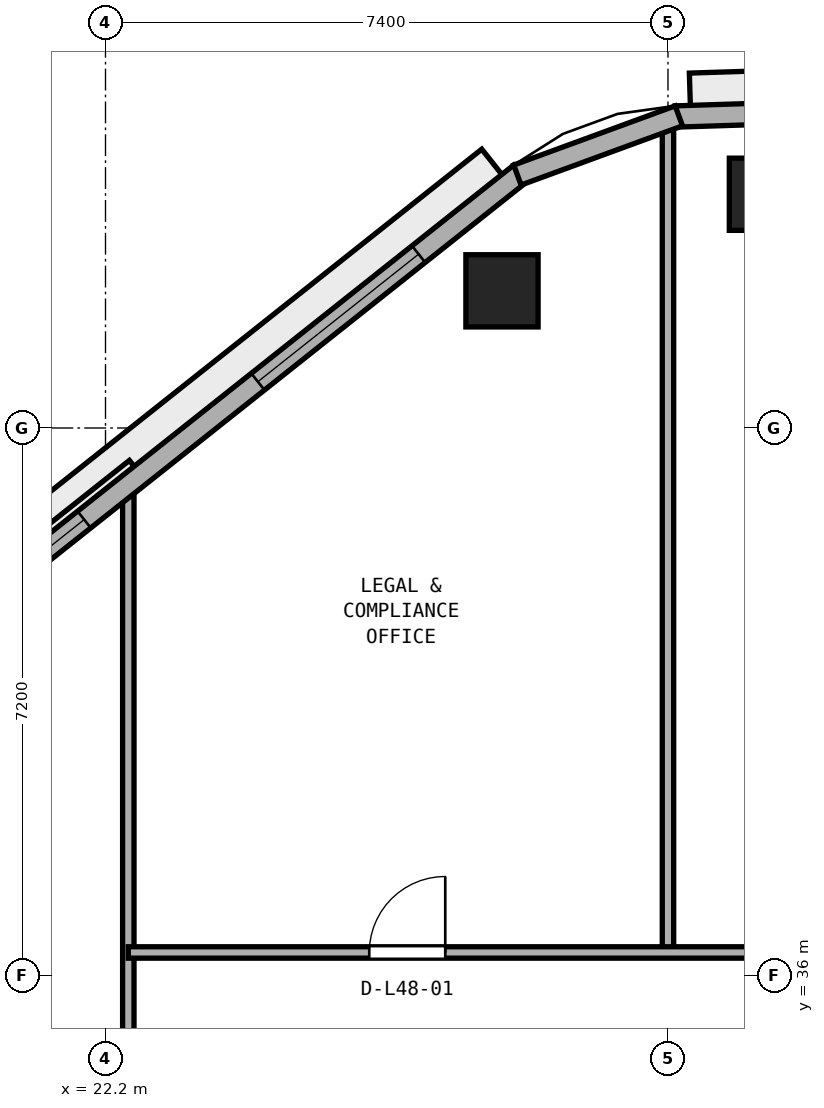
"""IFC4 building model, lengths in metres.
Left out: names, types, materials, properties, quantities, classifications, styles, units other than length and angle.
Written with IfcOpenShell. Run it as: python <this file> out.ifc"""

import sys

from ifc_helpers import new_model, si_unit, direction, frame, frame_2d, origin, origin_2d, place, context, subcontext, project, spatial, rectangle, extrude, element, fill, save


model = new_model("IFC4")
c1 = context("Model", 3, precision=1e-05, world=origin(), true_north=direction((0.0, 1.0)))
c2 = subcontext(c1, "Body", "Model", "MODEL_VIEW")
j1 = project(units=[si_unit("LENGTHUNIT", "METRE"), si_unit("PLANEANGLEUNIT", "RADIAN")], contexts=[c1])
p1 = place(None, origin())
s1 = spatial("IfcSite", under=j1, at=p1, CompositionType="ELEMENT")
p2 = place(p1, origin())
s2 = spatial("IfcBuilding", under=s1, at=p2, CompositionType="ELEMENT")
p3 = place(p2, frame((0.0, 0.0, 189.6)))
s3 = spatial("IfcBuildingStorey", under=s2, at=p3, CompositionType="ELEMENT", Elevation=189.6)
for number, where, z_axis, x_axis in (
    (1, (30.882, 46.275, 0.0), (0.0, 0.0, 1.0), (1.0, 0.0, 0.0)),
    (2, (27.416, 45.004, 0.0), (0.0, 0.0, 1.0), (1.0, 0.0, 0.0)),
):
    element("IfcColumn", number, at=place(p3, frame(where, z_axis=z_axis, x_axis=x_axis)), inside=s3, PredefinedType="COLUMN", context=c2, shape_type="SweptSolid", body=[
        extrude(rectangle(XDim=0.95, YDim=0.95, at=origin_2d()), origin(), (0.0, 0.0, 1.0), 3.8),
    ])
p4 = place(p3, frame((29.6, 36.3, 0.0), z_axis=(0.0, 0.0, 1.0), x_axis=(0.0, 1.0, 0.0)))
e3 = element("IfcWall", 3, at=p4, inside=s3, PredefinedType="PARTITIONING", context=c2, shape_type="SweptSolid", body=[
    extrude(rectangle(XDim=10.919, YDim=0.15, at=frame_2d((5.46, 0.0))), origin(), (0.0, 0.0, 1.0), 3.54),
])
p5 = place(p3, frame((22.5, 26.55, 0.0), z_axis=(0.0, 0.0, 1.0), x_axis=(0.0, 1.0, 0.0)))
e4 = element("IfcWall", 4, at=p5, inside=s3, PredefinedType="PARTITIONING", context=c2, shape_type="SweptSolid", body=[
    extrude(rectangle(XDim=15.945, YDim=0.15, at=frame_2d((7.972, 0.0))), origin(), (0.0, 0.0, 1.0), 3.54),
])
p6 = place(p5, frame((6.35, 0.0, 0.0)))
e5 = element("IfcOpeningElement", 5, at=p6, cuts=e4, PredefinedType="OPENING", context=c2, shape_type="SweptSolid", body=[
    extrude(rectangle(XDim=0.9, YDim=2.1, at=frame_2d((0.45, 1.05))), frame((0.0, 0.085, 0.0), z_axis=(0.0, -1.0, 0.0), x_axis=(1.0, 0.0, 0.0)), (0.0, 0.0, 1.0), 0.17),
])
p7 = place(p3, frame((22.5, 36.3, 0.0), z_axis=(0.0, 0.0, 1.0), x_axis=(1.0, 0.0, 0.0)))
e6 = element("IfcWall", 6, at=p7, inside=s3, PredefinedType="PARTITIONING", context=c2, shape_type="SweptSolid", body=[
    extrude(rectangle(XDim=11.9, YDim=0.15, at=frame_2d((5.95, 0.0))), origin(), (0.0, 0.0, 1.0), 3.54),
])
p8 = place(p7, frame((3.17, 0.0, 0.0)))
e7 = element("IfcOpeningElement", 7, at=p8, cuts=e6, PredefinedType="OPENING", context=c2, shape_type="SweptSolid", body=[
    extrude(rectangle(XDim=1.0, YDim=2.12, at=frame_2d((0.5, 1.06))), frame((0.0, 0.085, 0.0), z_axis=(0.0, -1.0, 0.0), x_axis=(1.0, 0.0, 0.0)), (0.0, 0.0, 1.0), 0.17),
])
p9 = place(p7, frame((8.88, 0.0, 0.0)))
e8 = element("IfcOpeningElement", 8, at=p9, cuts=e6, PredefinedType="OPENING", context=c2, shape_type="SweptSolid", body=[
    extrude(rectangle(XDim=1.0, YDim=2.12, at=frame_2d((0.5, 1.06))), frame((0.0, 0.085, 0.0), z_axis=(0.0, -1.0, 0.0), x_axis=(1.0, 0.0, 0.0)), (0.0, 0.0, 1.0), 0.17),
])
p10 = place(p3, frame((46.143, 47.82, 0.0), z_axis=(0.0, 0.0, 1.0), x_axis=(-0.999497065256, -0.031711457627, 0.0)))
e9 = element("IfcWall", 9, at=p10, inside=s3, PredefinedType="STANDARD", context=c2, shape_type="SweptSolid", body=[
    extrude(rectangle(XDim=16.452, YDim=0.28, at=frame_2d((8.226, 0.0))), origin(), (0.0, 0.0, 1.0), 3.54),
])
p11 = place(p10, frame((7.676, 0.0, 0.0)))
e10 = element("IfcOpeningElement", 10, at=p11, cuts=e9, PredefinedType="OPENING", context=c2, shape_type="SweptSolid", body=[
    extrude(rectangle(XDim=1.1, YDim=2.2, at=frame_2d((0.55, 1.1))), frame((0.0, 0.15, 0.0), z_axis=(0.0, -1.0, 0.0), x_axis=(1.0, 0.0, 0.0)), (0.0, 0.0, 1.0), 0.3),
])
p12 = place(p10, frame((1.725, 0.0, 0.9)))
e11 = element("IfcOpeningElement", 11, at=p12, cuts=e9, PredefinedType="OPENING", context=c2, shape_type="SweptSolid", body=[
    extrude(rectangle(XDim=2.7, YDim=1.75, at=frame_2d((1.35, 0.875))), frame((0.0, 0.15, 0.0), z_axis=(0.0, -1.0, 0.0), x_axis=(1.0, 0.0, 0.0)), (0.0, 0.0, 1.0), 0.3),
])
p13 = place(p10, frame((12.027, 0.0, 0.9)))
e12 = element("IfcOpeningElement", 12, at=p13, cuts=e9, PredefinedType="OPENING", context=c2, shape_type="SweptSolid", body=[
    extrude(rectangle(XDim=2.7, YDim=1.75, at=frame_2d((1.35, 0.875))), frame((0.0, 0.15, 0.0), z_axis=(0.0, -1.0, 0.0), x_axis=(1.0, 0.0, 0.0)), (0.0, 0.0, 1.0), 0.3),
])
p14 = place(p3, frame((27.658, 46.55, 0.0), z_axis=(0.0, 0.0, 1.0), x_axis=(-0.783266285861, -0.621686356158, 0.0)))
e13 = element("IfcWall", 13, at=p14, inside=s3, PredefinedType="STANDARD", context=c2, shape_type="SweptSolid", body=[
    extrude(rectangle(XDim=16.353, YDim=0.28, at=frame_2d((8.177, 0.0))), origin(), (0.0, 0.0, 1.0), 3.54),
])
p15 = place(p14, frame((1.709, 0.0, 0.9)))
e14 = element("IfcOpeningElement", 14, at=p15, cuts=e13, PredefinedType="OPENING", context=c2, shape_type="SweptSolid", body=[
    extrude(rectangle(XDim=2.7, YDim=1.75, at=frame_2d((1.35, 0.875))), frame((0.0, 0.15, 0.0), z_axis=(0.0, -1.0, 0.0), x_axis=(1.0, 0.0, 0.0)), (0.0, 0.0, 1.0), 0.3),
])
p16 = place(p14, frame((7.326, 0.0, 0.9)))
e15 = element("IfcOpeningElement", 15, at=p16, cuts=e13, PredefinedType="OPENING", context=c2, shape_type="SweptSolid", body=[
    extrude(rectangle(XDim=2.7, YDim=1.75, at=frame_2d((1.35, 0.875))), frame((0.0, 0.15, 0.0), z_axis=(0.0, -1.0, 0.0), x_axis=(1.0, 0.0, 0.0)), (0.0, 0.0, 1.0), 0.3),
])
p17 = place(p14, frame((11.944, 0.0, 0.9)))
e16 = element("IfcOpeningElement", 16, at=p17, cuts=e13, PredefinedType="OPENING", context=c2, shape_type="SweptSolid", body=[
    extrude(rectangle(XDim=2.7, YDim=1.75, at=frame_2d((1.35, 0.875))), frame((0.0, 0.15, 0.0), z_axis=(0.0, -1.0, 0.0), x_axis=(1.0, 0.0, 0.0)), (0.0, 0.0, 1.0), 0.3),
])
p18 = place(p3, frame((29.743, 47.306, 0.0), z_axis=(0.0, 0.0, 1.0), x_axis=(-0.93893328381, -0.344099242302, 0.0)))
e17 = element("IfcWall", 17, at=p18, inside=s3, PredefinedType="STANDARD", context=c2, shape_type="SweptSolid", body=[
    extrude(rectangle(XDim=2.262, YDim=0.28, at=frame_2d((1.131, 0.0))), origin(), (0.0, 0.0, 1.0), 3.54),
])
p19 = place(p8, origin())
e18 = element("IfcDoor", 18, at=p19, inside=s3, OperationType="SINGLE_SWING_RIGHT", PredefinedType="DOOR", context=c2, shape_type="SweptSolid", body=[
    extrude(rectangle(XDim=1.0, YDim=2.12, at=frame_2d((0.5, 1.06))), frame((0.0, 0.025, 0.0), z_axis=(0.0, -1.0, 0.0), x_axis=(1.0, 0.0, 0.0)), (0.0, 0.0, 1.0), 0.05),
])
fill(e7, e18)
p20 = place(p15, origin())
e19 = element("IfcWindow", 19, at=p20, inside=s3, PartitioningType="SINGLE_PANEL", PredefinedType="WINDOW", context=c2, shape_type="SweptSolid", body=[
    extrude(rectangle(XDim=2.7, YDim=1.75, at=frame_2d((1.35, 0.875))), frame((0.0, 0.03, 0.0), z_axis=(0.0, -1.0, 0.0), x_axis=(1.0, 0.0, 0.0)), (0.0, 0.0, 1.0), 0.06),
])
fill(e14, e19)
p21 = place(p16, origin())
e20 = element("IfcWindow", 20, at=p21, inside=s3, PartitioningType="SINGLE_PANEL", PredefinedType="WINDOW", context=c2, shape_type="SweptSolid", body=[
    extrude(rectangle(XDim=2.7, YDim=1.75, at=frame_2d((1.35, 0.875))), frame((0.0, 0.03, 0.0), z_axis=(0.0, -1.0, 0.0), x_axis=(1.0, 0.0, 0.0)), (0.0, 0.0, 1.0), 0.06),
])
fill(e15, e20)
save(model, sys.argv[1])
